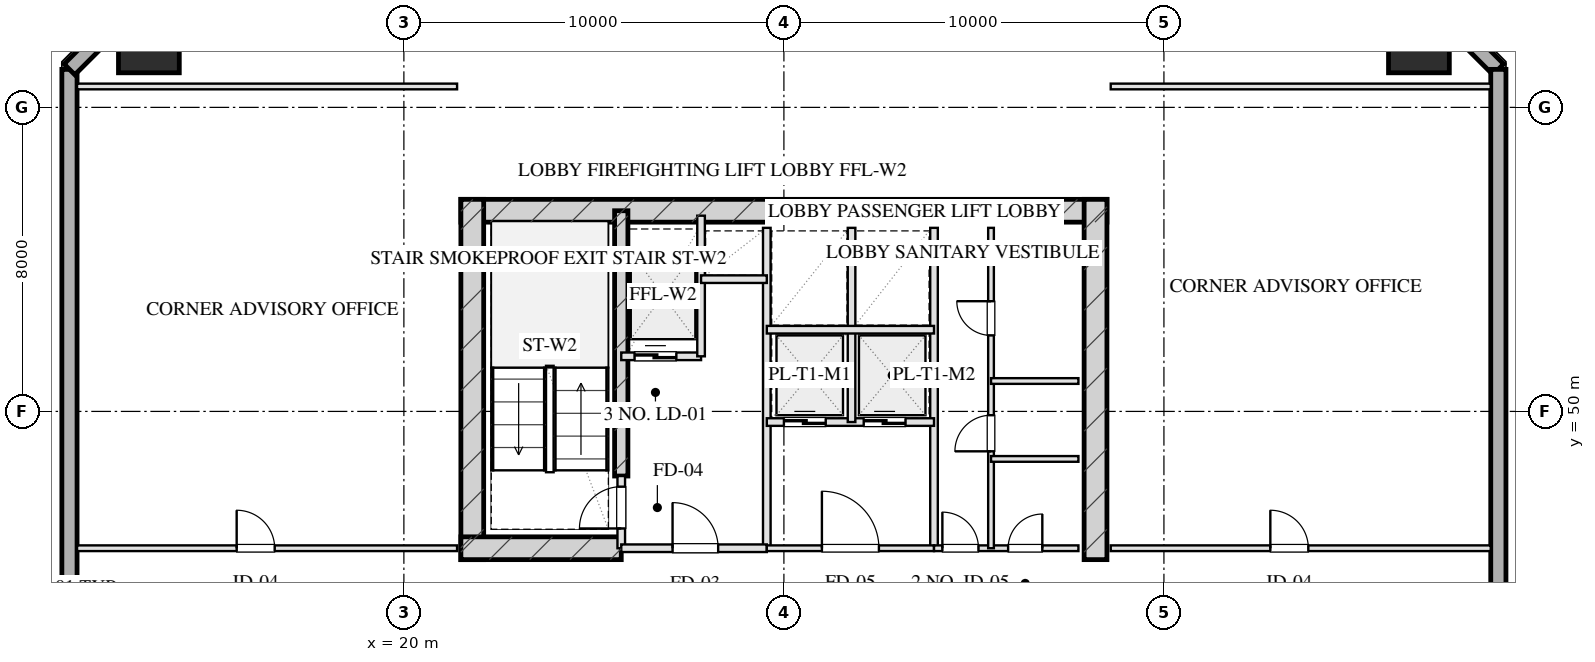
"""IFC4 building model, lengths in metres.
Left out: names, types, materials, properties, quantities, classifications, styles, units other than length and angle.
Written with IfcOpenShell. Run it as: python <this file> out.ifc"""

import sys

from ifc_helpers import new_model, si_unit, direction, frame, frame_2d, origin, origin_2d, place, context, subcontext, project, spatial, rectangle, hollow_rectangle, extrude, element, fill, save


model = new_model("IFC4")
c1 = context("Model", 3, precision=1e-05, world=origin(), true_north=direction((0.0, 1.0)))
c2 = subcontext(c1, "Body", "Model", "MODEL_VIEW")
j1 = project(units=[si_unit("LENGTHUNIT", "METRE"), si_unit("PLANEANGLEUNIT", "RADIAN")], contexts=[c1])
p1 = place(None, origin())
s1 = spatial("IfcSite", under=j1, at=p1, CompositionType="ELEMENT")
p2 = place(p1, origin())
s2 = spatial("IfcBuilding", under=s1, at=p2, CompositionType="ELEMENT")
p3 = place(p2, frame((0.0, 0.0, 110.4)))
s3 = spatial("IfcBuildingStorey", under=s2, at=p3, CompositionType="ELEMENT", Elevation=110.4)
p4 = place(p3, frame((21.5, 55.28, 0.0), z_axis=(0.0, 0.0, 1.0), x_axis=(1.0, 0.0, 0.0)))
e1 = element("IfcWall", 1, at=p4, inside=s3, PredefinedType="SHEAR", context=c2, shape_type="SweptSolid", body=[
    extrude(rectangle(XDim=17.0, YDim=0.6, at=frame_2d((8.5, 0.0))), origin(), (0.0, 0.0, 1.0), 3.45),
])
for number, where, z_axis, x_axis in (
    (2, (21.8, 46.1, 0.0), (0.0, 0.0, 1.0), (0.0, 1.0, 0.0)),
    (3, (38.2, 46.1, 0.0), (0.0, 0.0, 1.0), (0.0, 1.0, 0.0)),
):
    element("IfcWall", number, at=place(p3, frame(where, z_axis=z_axis, x_axis=x_axis)), inside=s3, PredefinedType="SHEAR", context=c2, shape_type="SweptSolid", body=[
        extrude(rectangle(XDim=9.48, YDim=0.6, at=frame_2d((4.74, 0.0))), origin(), (0.0, 0.0, 1.0), 3.45),
    ])
p5 = place(p3, frame((25.72, 48.3, 0.0), z_axis=(0.0, 0.0, 1.0), x_axis=(0.0, 1.0, 0.0)))
e4 = element("IfcWall", 4, at=p5, inside=s3, PredefinedType="SHEAR", context=c2, shape_type="SweptSolid", body=[
    extrude(rectangle(XDim=6.98, YDim=0.35, at=frame_2d((3.49, 0.0))), origin(), (0.0, 0.0, 1.0), 3.45),
])
p6 = place(p3, frame((21.5, 46.4, 0.0), z_axis=(0.0, 0.0, 1.0), x_axis=(1.0, 0.0, 0.0)))
e5 = element("IfcWall", 5, at=p6, inside=s3, PredefinedType="SHEAR", context=c2, shape_type="SweptSolid", body=[
    extrude(rectangle(XDim=4.22, YDim=0.6, at=frame_2d((2.11, 0.0))), origin(), (0.0, 0.0, 1.0), 3.45),
])
for number, where, z_axis, x_axis in (
    (6, (46.71, 59.71, 0.0), (0.0, 0.0, 1.0), (1.0, 0.0, 0.0)),
    (7, (13.29, 59.71, 0.0), (0.0, 0.0, 1.0), (1.0, 0.0, 0.0)),
):
    element("IfcColumn", number, at=place(p3, frame(where, z_axis=z_axis, x_axis=x_axis)), inside=s3, PredefinedType="COLUMN", context=c2, shape_type="SweptSolid", body=[
        extrude(hollow_rectangle(XDim=1.6, YDim=1.6, WallThickness=0.055, at=origin_2d()), origin(), (0.0, 0.0, 1.0), 3.451),
    ])
p7 = place(p3, frame((11.2, 9.0, 0.0), z_axis=(0.0, 0.0, 1.0), x_axis=(0.0, 1.0, 0.0)))
e8 = element("IfcWall", 8, at=p7, inside=s3, PredefinedType="SOLIDWALL", context=c2, shape_type="SweptSolid", body=[
    extrude(rectangle(XDim=50.0, YDim=0.4, at=frame_2d((25.0, 0.0))), origin(), (0.0, 0.0, 1.0), 2.61),
])
p8 = place(p7, frame((26.4, 0.0, 0.75)))
e9 = element("IfcOpeningElement", 9, at=p8, cuts=e8, PredefinedType="OPENING", context=c2, shape_type="SweptSolid", body=[
    extrude(rectangle(XDim=2.4, YDim=1.46, at=frame_2d((1.2, 0.73))), frame((0.0, 0.21, 0.0), z_axis=(0.0, -1.0, 0.0), x_axis=(1.0, 0.0, 0.0)), (0.0, 0.0, 1.0), 0.42),
])
p9 = place(p7, frame((18.65, 0.0, 0.0)))
e10 = element("IfcOpeningElement", 10, at=p9, cuts=e8, PredefinedType="OPENING", context=c2, shape_type="SweptSolid", body=[
    extrude(rectangle(XDim=1.1, YDim=2.15, at=frame_2d((0.55, 1.075))), frame((0.0, 0.21, 0.0), z_axis=(0.0, -1.0, 0.0), x_axis=(1.0, 0.0, 0.0)), (0.0, 0.0, 1.0), 0.42),
])
for number, where, z_axis, x_axis in (
    (11, (11.2, 59.0, 0.0), (0.0, 0.0, 1.0), (0.707, 0.707, 0.0)),
    (12, (46.0, 61.8, 0.0), (0.0, 0.0, 1.0), (0.707, -0.707, 0.0)),
):
    element("IfcWall", number, at=place(p3, frame(where, z_axis=z_axis, x_axis=x_axis)), inside=s3, PredefinedType="SOLIDWALL", context=c2, shape_type="SweptSolid", body=[
        extrude(rectangle(XDim=3.96, YDim=0.4, at=frame_2d((1.98, 0.0))), origin(), (0.0, 0.0, 1.0), 2.61),
    ])
p10 = place(p3, frame((48.8, 59.0, 0.0), z_axis=(0.0, 0.0, 1.0), x_axis=(0.0, -1.0, 0.0)))
e13 = element("IfcWall", 13, at=p10, inside=s3, PredefinedType="SOLIDWALL", context=c2, shape_type="SweptSolid", body=[
    extrude(rectangle(XDim=50.0, YDim=0.4, at=frame_2d((25.0, 0.0))), origin(), (0.0, 0.0, 1.0), 2.61),
])
p11 = place(p10, frame((17.4, 0.0, 0.75)))
e14 = element("IfcOpeningElement", 14, at=p11, cuts=e13, PredefinedType="OPENING", context=c2, shape_type="SweptSolid", body=[
    extrude(rectangle(XDim=2.4, YDim=1.46, at=frame_2d((1.2, 0.73))), frame((0.0, 0.21, 0.0), z_axis=(0.0, -1.0, 0.0), x_axis=(1.0, 0.0, 0.0)), (0.0, 0.0, 1.0), 0.42),
])
p12 = place(p10, frame((30.226, 0.0, 0.0)))
e15 = element("IfcOpeningElement", 15, at=p12, cuts=e13, PredefinedType="OPENING", context=c2, shape_type="SweptSolid", body=[
    extrude(rectangle(XDim=1.1, YDim=2.15, at=frame_2d((0.55, 1.075))), frame((0.0, 0.21, 0.0), z_axis=(0.0, -1.0, 0.0), x_axis=(1.0, 0.0, 0.0)), (0.0, 0.0, 1.0), 0.42),
])
p13 = place(p3, frame((25.72, 46.4, 0.0), z_axis=(0.0, 0.0, 1.0), x_axis=(0.0, 1.0, 0.0)))
e16 = element("IfcWall", 16, at=p13, inside=s3, PredefinedType="PARTITIONING", context=c2, shape_type="SweptSolid", body=[
    extrude(rectangle(XDim=1.9, YDim=0.2, at=frame_2d((0.95, 0.0))), origin(), (0.0, 0.0, 1.0), 3.175),
])
p14 = place(p13, frame((0.52, 0.0, 0.0)))
e17 = element("IfcOpeningElement", 17, at=p14, cuts=e16, PredefinedType="OPENING", context=c2, shape_type="SweptSolid", body=[
    extrude(rectangle(XDim=1.1, YDim=2.05, at=frame_2d((0.55, 1.025))), frame((0.0, 0.11, 0.0), z_axis=(0.0, -1.0, 0.0), x_axis=(1.0, 0.0, 0.0)), (0.0, 0.0, 1.0), 0.22),
])
p15 = place(p3, frame((29.55, 46.4, 0.0), z_axis=(0.0, 0.0, 1.0), x_axis=(0.0, 1.0, 0.0)))
e18 = element("IfcWall", 18, at=p15, inside=s3, PredefinedType="PARTITIONING", context=c2, shape_type="SweptSolid", body=[
    extrude(rectangle(XDim=8.43, YDim=0.2, at=frame_2d((4.215, 0.0))), origin(), (0.0, 0.0, 1.0), 3.175),
])
p16 = place(p3, frame((25.72, 46.4, 0.0), z_axis=(0.0, 0.0, 1.0), x_axis=(1.0, 0.0, 0.0)))
e19 = element("IfcWall", 19, at=p16, inside=s3, PredefinedType="PARTITIONING", context=c2, shape_type="SweptSolid", body=[
    extrude(rectangle(XDim=3.83, YDim=0.2, at=frame_2d((1.915, 0.0))), origin(), (0.0, 0.0, 1.0), 3.175),
])
p17 = place(p16, frame((1.35, 0.0, 0.0)))
e20 = element("IfcOpeningElement", 20, at=p17, cuts=e19, PredefinedType="OPENING", context=c2, shape_type="SweptSolid", body=[
    extrude(rectangle(XDim=1.2, YDim=2.05, at=frame_2d((0.6, 1.025))), frame((0.0, 0.11, 0.0), z_axis=(0.0, -1.0, 0.0), x_axis=(1.0, 0.0, 0.0)), (0.0, 0.0, 1.0), 0.22),
])
p18 = place(p3, frame((25.72, 51.45, 0.0), z_axis=(0.0, 0.0, 1.0), x_axis=(1.0, 0.0, 0.0)))
e21 = element("IfcWall", 21, at=p18, inside=s3, PredefinedType="PARTITIONING", context=c2, shape_type="SweptSolid", body=[
    extrude(rectangle(XDim=2.1, YDim=0.2, at=frame_2d((1.05, 0.0))), origin(), (0.0, 0.0, 1.0), 3.175),
])
p19 = place(p18, frame((0.35, 0.0, 0.0)))
e22 = element("IfcOpeningElement", 22, at=p19, cuts=e21, PredefinedType="OPENING", context=c2, shape_type="SweptSolid", body=[
    extrude(rectangle(XDim=1.1, YDim=2.05, at=frame_2d((0.55, 1.025))), frame((0.0, 0.11, 0.0), z_axis=(0.0, -1.0, 0.0), x_axis=(1.0, 0.0, 0.0)), (0.0, 0.0, 1.0), 0.22),
])
p20 = place(p3, frame((27.82, 51.45, 0.0), z_axis=(0.0, 0.0, 1.0), x_axis=(0.0, 1.0, 0.0)))
e23 = element("IfcWall", 23, at=p20, inside=s3, PredefinedType="PARTITIONING", context=c2, shape_type="SweptSolid", body=[
    extrude(rectangle(XDim=3.7, YDim=0.2, at=frame_2d((1.85, 0.0))), origin(), (0.0, 0.0, 1.0), 3.175),
])
p21 = place(p3, frame((27.82, 53.48, 0.0), z_axis=(0.0, 0.0, 1.0), x_axis=(1.0, 0.0, 0.0)))
e24 = element("IfcWall", 24, at=p21, inside=s3, PredefinedType="PARTITIONING", context=c2, shape_type="SweptSolid", body=[
    extrude(rectangle(XDim=1.73, YDim=0.2, at=frame_2d((0.865, 0.0))), origin(), (0.0, 0.0, 1.0), 3.175),
])
p22 = place(p3, frame((33.95, 46.4, 0.0), z_axis=(0.0, 0.0, 1.0), x_axis=(0.0, 1.0, 0.0)))
e25 = element("IfcWall", 25, at=p22, inside=s3, PredefinedType="PARTITIONING", context=c2, shape_type="SweptSolid", body=[
    extrude(rectangle(XDim=8.43, YDim=0.2, at=frame_2d((4.215, 0.0))), origin(), (0.0, 0.0, 1.0), 3.175),
])
p23 = place(p3, frame((29.55, 46.4, 0.0), z_axis=(0.0, 0.0, 1.0), x_axis=(1.0, 0.0, 0.0)))
e26 = element("IfcWall", 26, at=p23, inside=s3, PredefinedType="PARTITIONING", context=c2, shape_type="SweptSolid", body=[
    extrude(rectangle(XDim=4.4, YDim=0.15, at=frame_2d((2.2, 0.0))), origin(), (0.0, 0.0, 1.0), 3.175),
])
p24 = place(p23, frame((1.45, 0.0, 0.0)))
e27 = element("IfcOpeningElement", 27, at=p24, cuts=e26, PredefinedType="OPENING", context=c2, shape_type="SweptSolid", body=[
    extrude(rectangle(XDim=1.5, YDim=2.05, at=frame_2d((0.75, 1.025))), frame((0.0, 0.085, 0.0), z_axis=(0.0, -1.0, 0.0), x_axis=(1.0, 0.0, 0.0)), (0.0, 0.0, 1.0), 0.17),
])
p25 = place(p3, frame((29.55, 49.72, 0.0), z_axis=(0.0, 0.0, 1.0), x_axis=(1.0, 0.0, 0.0)))
e28 = element("IfcWall", 28, at=p25, inside=s3, PredefinedType="PARTITIONING", context=c2, shape_type="SweptSolid", body=[
    extrude(rectangle(XDim=4.4, YDim=0.2, at=frame_2d((2.2, 0.0))), origin(), (0.0, 0.0, 1.0), 3.175),
])
p26 = place(p25, frame((0.45, 0.0, 0.0)))
e29 = element("IfcOpeningElement", 29, at=p26, cuts=e28, PredefinedType="OPENING", context=c2, shape_type="SweptSolid", body=[
    extrude(rectangle(XDim=1.1, YDim=2.05, at=frame_2d((0.55, 1.025))), frame((0.0, 0.11, 0.0), z_axis=(0.0, -1.0, 0.0), x_axis=(1.0, 0.0, 0.0)), (0.0, 0.0, 1.0), 0.22),
])
p27 = place(p25, frame((2.55, 0.0, 0.0)))
e30 = element("IfcOpeningElement", 30, at=p27, cuts=e28, PredefinedType="OPENING", context=c2, shape_type="SweptSolid", body=[
    extrude(rectangle(XDim=1.1, YDim=2.05, at=frame_2d((0.55, 1.025))), frame((0.0, 0.11, 0.0), z_axis=(0.0, -1.0, 0.0), x_axis=(1.0, 0.0, 0.0)), (0.0, 0.0, 1.0), 0.22),
])
p28 = place(p3, frame((31.78, 49.72, 0.0), z_axis=(0.0, 0.0, 1.0), x_axis=(0.0, 1.0, 0.0)))
e31 = element("IfcWall", 31, at=p28, inside=s3, PredefinedType="PARTITIONING", context=c2, shape_type="SweptSolid", body=[
    extrude(rectangle(XDim=5.11, YDim=0.2, at=frame_2d((2.555, 0.0))), origin(), (0.0, 0.0, 1.0), 3.175),
])
p29 = place(p3, frame((29.55, 52.15, 0.0), z_axis=(0.0, 0.0, 1.0), x_axis=(1.0, 0.0, 0.0)))
e32 = element("IfcWall", 32, at=p29, inside=s3, PredefinedType="PARTITIONING", context=c2, shape_type="SweptSolid", body=[
    extrude(rectangle(XDim=4.4, YDim=0.2, at=frame_2d((2.2, 0.0))), origin(), (0.0, 0.0, 1.0), 3.175),
])
p30 = place(p3, frame((33.95, 46.4, 0.0), z_axis=(0.0, 0.0, 1.0), x_axis=(1.0, 0.0, 0.0)))
e33 = element("IfcWall", 33, at=p30, inside=s3, PredefinedType="PARTITIONING", context=c2, shape_type="SweptSolid", body=[
    extrude(rectangle(XDim=3.8, YDim=0.15, at=frame_2d((1.9, 0.0))), origin(), (0.0, 0.0, 1.0), 3.175),
])
p31 = place(p30, frame((0.22, 0.0, 0.0)))
e34 = element("IfcOpeningElement", 34, at=p31, cuts=e33, PredefinedType="OPENING", context=c2, shape_type="SweptSolid", body=[
    extrude(rectangle(XDim=0.95, YDim=2.05, at=frame_2d((0.475, 1.025))), frame((0.0, 0.085, 0.0), z_axis=(0.0, -1.0, 0.0), x_axis=(1.0, 0.0, 0.0)), (0.0, 0.0, 1.0), 0.17),
])
p32 = place(p30, frame((1.95, 0.0, 0.0)))
e35 = element("IfcOpeningElement", 35, at=p32, cuts=e33, PredefinedType="OPENING", context=c2, shape_type="SweptSolid", body=[
    extrude(rectangle(XDim=0.9, YDim=2.05, at=frame_2d((0.45, 1.025))), frame((0.0, 0.085, 0.0), z_axis=(0.0, -1.0, 0.0), x_axis=(1.0, 0.0, 0.0)), (0.0, 0.0, 1.0), 0.17),
])
p33 = place(p3, frame((35.45, 46.4, 0.0), z_axis=(0.0, 0.0, 1.0), x_axis=(0.0, 1.0, 0.0)))
e36 = element("IfcWall", 36, at=p33, inside=s3, PredefinedType="PARTITIONING", context=c2, shape_type="SweptSolid", body=[
    extrude(rectangle(XDim=8.43, YDim=0.15, at=frame_2d((4.215, 0.0))), origin(), (0.0, 0.0, 1.0), 2.765),
])
p34 = place(p33, frame((2.55, 0.0, 0.0)))
e37 = element("IfcOpeningElement", 37, at=p34, cuts=e36, PredefinedType="OPENING", context=c2, shape_type="SweptSolid", body=[
    extrude(rectangle(XDim=0.95, YDim=2.05, at=frame_2d((0.475, 1.025))), frame((0.0, 0.085, 0.0), z_axis=(0.0, -1.0, 0.0), x_axis=(1.0, 0.0, 0.0)), (0.0, 0.0, 1.0), 0.17),
])
p35 = place(p33, frame((5.6, 0.0, 0.0)))
e38 = element("IfcOpeningElement", 38, at=p35, cuts=e36, PredefinedType="OPENING", context=c2, shape_type="SweptSolid", body=[
    extrude(rectangle(XDim=0.9, YDim=2.05, at=frame_2d((0.45, 1.025))), frame((0.0, 0.085, 0.0), z_axis=(0.0, -1.0, 0.0), x_axis=(1.0, 0.0, 0.0)), (0.0, 0.0, 1.0), 0.17),
])
for number, where, z_axis, x_axis in (
    (39, (35.45, 50.8, 0.0), (0.0, 0.0, 1.0), (1.0, 0.0, 0.0)),
    (40, (35.45, 48.75, 0.0), (0.0, 0.0, 1.0), (1.0, 0.0, 0.0)),
):
    element("IfcWall", number, at=place(p3, frame(where, z_axis=z_axis, x_axis=x_axis)), inside=s3, PredefinedType="PARTITIONING", context=c2, shape_type="SweptSolid", body=[
        extrude(rectangle(XDim=2.3, YDim=0.15, at=frame_2d((1.15, 0.0))), origin(), (0.0, 0.0, 1.0), 3.175),
    ])
p36 = place(p3, frame((11.4, 58.55, 0.0), z_axis=(0.0, 0.0, 1.0), x_axis=(1.0, 0.0, 0.0)))
e41 = element("IfcWall", 41, at=p36, inside=s3, PredefinedType="PARTITIONING", context=c2, shape_type="SweptSolid", body=[
    extrude(rectangle(XDim=10.0, YDim=0.15, at=frame_2d((5.0, 0.0))), origin(), (0.0, 0.0, 1.0), 3.175),
])
p37 = place(p3, frame((11.4, 46.4, 0.0), z_axis=(0.0, 0.0, 1.0), x_axis=(1.0, 0.0, 0.0)))
e42 = element("IfcWall", 42, at=p37, inside=s3, PredefinedType="PARTITIONING", context=c2, shape_type="SweptSolid", body=[
    extrude(rectangle(XDim=10.0, YDim=0.15, at=frame_2d((5.0, 0.0))), origin(), (0.0, 0.0, 1.0), 3.175),
])
p38 = place(p37, frame((4.2, 0.0, 0.0)))
e43 = element("IfcOpeningElement", 43, at=p38, cuts=e42, PredefinedType="OPENING", context=c2, shape_type="SweptSolid", body=[
    extrude(rectangle(XDim=1.0, YDim=2.05, at=frame_2d((0.5, 1.025))), frame((0.0, 0.085, 0.0), z_axis=(0.0, -1.0, 0.0), x_axis=(1.0, 0.0, 0.0)), (0.0, 0.0, 1.0), 0.17),
])
p39 = place(p3, frame((38.6, 58.55, 0.0), z_axis=(0.0, 0.0, 1.0), x_axis=(1.0, 0.0, 0.0)))
e44 = element("IfcWall", 44, at=p39, inside=s3, PredefinedType="PARTITIONING", context=c2, shape_type="SweptSolid", body=[
    extrude(rectangle(XDim=10.0, YDim=0.15, at=frame_2d((5.0, 0.0))), origin(), (0.0, 0.0, 1.0), 3.175),
])
p40 = place(p3, frame((38.6, 46.4, 0.0), z_axis=(0.0, 0.0, 1.0), x_axis=(1.0, 0.0, 0.0)))
e45 = element("IfcWall", 45, at=p40, inside=s3, PredefinedType="PARTITIONING", context=c2, shape_type="SweptSolid", body=[
    extrude(rectangle(XDim=10.0, YDim=0.15, at=frame_2d((5.0, 0.0))), origin(), (0.0, 0.0, 1.0), 3.175),
])
p41 = place(p40, frame((4.2, 0.0, 0.0)))
e46 = element("IfcOpeningElement", 46, at=p41, cuts=e45, PredefinedType="OPENING", context=c2, shape_type="SweptSolid", body=[
    extrude(rectangle(XDim=1.0, YDim=2.05, at=frame_2d((0.5, 1.025))), frame((0.0, 0.085, 0.0), z_axis=(0.0, -1.0, 0.0), x_axis=(1.0, 0.0, 0.0)), (0.0, 0.0, 1.0), 0.17),
])
p42 = place(p14, origin())
e47 = element("IfcDoor", 47, at=p42, inside=s3, OperationType="SINGLE_SWING_LEFT", PredefinedType="DOOR", context=c2, shape_type="SweptSolid", body=[
    extrude(rectangle(XDim=1.1, YDim=2.05, at=frame_2d((0.55, 1.025))), frame((0.0, 0.025, 0.0), z_axis=(0.0, -1.0, 0.0), x_axis=(1.0, 0.0, 0.0)), (0.0, 0.0, 1.0), 0.05),
])
fill(e17, e47)
p43 = place(p17, origin())
e48 = element("IfcDoor", 48, at=p43, inside=s3, OperationType="SINGLE_SWING_LEFT", PredefinedType="DOOR", context=c2, shape_type="SweptSolid", body=[
    extrude(rectangle(XDim=1.2, YDim=2.05, at=frame_2d((0.6, 1.025))), frame((0.0, 0.025, 0.0), z_axis=(0.0, -1.0, 0.0), x_axis=(1.0, 0.0, 0.0)), (0.0, 0.0, 1.0), 0.05),
])
fill(e20, e48)
p44 = place(p19, origin())
e49 = element("IfcDoor", 49, at=p44, inside=s3, OperationType="DOUBLE_DOOR_SLIDING", PredefinedType="DOOR", context=c2, shape_type="SweptSolid", body=[
    extrude(rectangle(XDim=1.1, YDim=2.05, at=frame_2d((0.55, 1.025))), frame((0.0, 0.025, 0.0), z_axis=(0.0, -1.0, 0.0), x_axis=(1.0, 0.0, 0.0)), (0.0, 0.0, 1.0), 0.05),
])
fill(e22, e49)
p45 = place(p24, origin())
e50 = element("IfcDoor", 50, at=p45, inside=s3, OperationType="SINGLE_SWING_LEFT", PredefinedType="DOOR", context=c2, shape_type="SweptSolid", body=[
    extrude(rectangle(XDim=1.5, YDim=2.05, at=frame_2d((0.75, 1.025))), frame((0.0, 0.025, 0.0), z_axis=(0.0, -1.0, 0.0), x_axis=(1.0, 0.0, 0.0)), (0.0, 0.0, 1.0), 0.05),
])
fill(e27, e50)
p46 = place(p26, origin())
e51 = element("IfcDoor", 51, at=p46, inside=s3, OperationType="DOUBLE_DOOR_SLIDING", PredefinedType="DOOR", context=c2, shape_type="SweptSolid", body=[
    extrude(rectangle(XDim=1.1, YDim=2.05, at=frame_2d((0.55, 1.025))), frame((0.0, 0.025, 0.0), z_axis=(0.0, -1.0, 0.0), x_axis=(1.0, 0.0, 0.0)), (0.0, 0.0, 1.0), 0.05),
])
fill(e29, e51)
p47 = place(p27, origin())
e52 = element("IfcDoor", 52, at=p47, inside=s3, OperationType="DOUBLE_DOOR_SLIDING", PredefinedType="DOOR", context=c2, shape_type="SweptSolid", body=[
    extrude(rectangle(XDim=1.1, YDim=2.05, at=frame_2d((0.55, 1.025))), frame((0.0, 0.025, 0.0), z_axis=(0.0, -1.0, 0.0), x_axis=(1.0, 0.0, 0.0)), (0.0, 0.0, 1.0), 0.05),
])
fill(e30, e52)
p48 = place(p31, origin())
e53 = element("IfcDoor", 53, at=p48, inside=s3, OperationType="SINGLE_SWING_LEFT", PredefinedType="DOOR", context=c2, shape_type="SweptSolid", body=[
    extrude(rectangle(XDim=0.95, YDim=2.05, at=frame_2d((0.475, 1.025))), frame((0.0, 0.025, 0.0), z_axis=(0.0, -1.0, 0.0), x_axis=(1.0, 0.0, 0.0)), (0.0, 0.0, 1.0), 0.05),
])
fill(e34, e53)
p49 = place(p32, origin())
e54 = element("IfcDoor", 54, at=p49, inside=s3, OperationType="SINGLE_SWING_RIGHT", PredefinedType="DOOR", context=c2, shape_type="SweptSolid", body=[
    extrude(rectangle(XDim=0.9, YDim=2.05, at=frame_2d((0.45, 1.025))), frame((0.0, 0.025, 0.0), z_axis=(0.0, -1.0, 0.0), x_axis=(1.0, 0.0, 0.0)), (0.0, 0.0, 1.0), 0.05),
])
fill(e35, e54)
p50 = place(p34, origin())
e55 = element("IfcDoor", 55, at=p50, inside=s3, OperationType="SINGLE_SWING_LEFT", PredefinedType="DOOR", context=c2, shape_type="SweptSolid", body=[
    extrude(rectangle(XDim=0.95, YDim=2.05, at=frame_2d((0.475, 1.025))), frame((0.0, 0.025, 0.0), z_axis=(0.0, -1.0, 0.0), x_axis=(1.0, 0.0, 0.0)), (0.0, 0.0, 1.0), 0.05),
])
fill(e37, e55)
p51 = place(p35, origin())
e56 = element("IfcDoor", 56, at=p51, inside=s3, OperationType="SINGLE_SWING_RIGHT", PredefinedType="DOOR", context=c2, shape_type="SweptSolid", body=[
    extrude(rectangle(XDim=0.9, YDim=2.05, at=frame_2d((0.45, 1.025))), frame((0.0, 0.025, 0.0), z_axis=(0.0, -1.0, 0.0), x_axis=(1.0, 0.0, 0.0)), (0.0, 0.0, 1.0), 0.05),
])
fill(e38, e56)
p52 = place(p38, origin())
e57 = element("IfcDoor", 57, at=p52, inside=s3, OperationType="SINGLE_SWING_LEFT", PredefinedType="DOOR", context=c2, shape_type="SweptSolid", body=[
    extrude(rectangle(XDim=1.0, YDim=2.05, at=frame_2d((0.5, 1.025))), frame((0.0, 0.025, 0.0), z_axis=(0.0, -1.0, 0.0), x_axis=(1.0, 0.0, 0.0)), (0.0, 0.0, 1.0), 0.05),
])
fill(e43, e57)
p53 = place(p41, origin())
e58 = element("IfcDoor", 58, at=p53, inside=s3, OperationType="SINGLE_SWING_LEFT", PredefinedType="DOOR", context=c2, shape_type="SweptSolid", body=[
    extrude(rectangle(XDim=1.0, YDim=2.05, at=frame_2d((0.5, 1.025))), frame((0.0, 0.025, 0.0), z_axis=(0.0, -1.0, 0.0), x_axis=(1.0, 0.0, 0.0)), (0.0, 0.0, 1.0), 0.05),
])
fill(e46, e58)
save(model, sys.argv[1])
